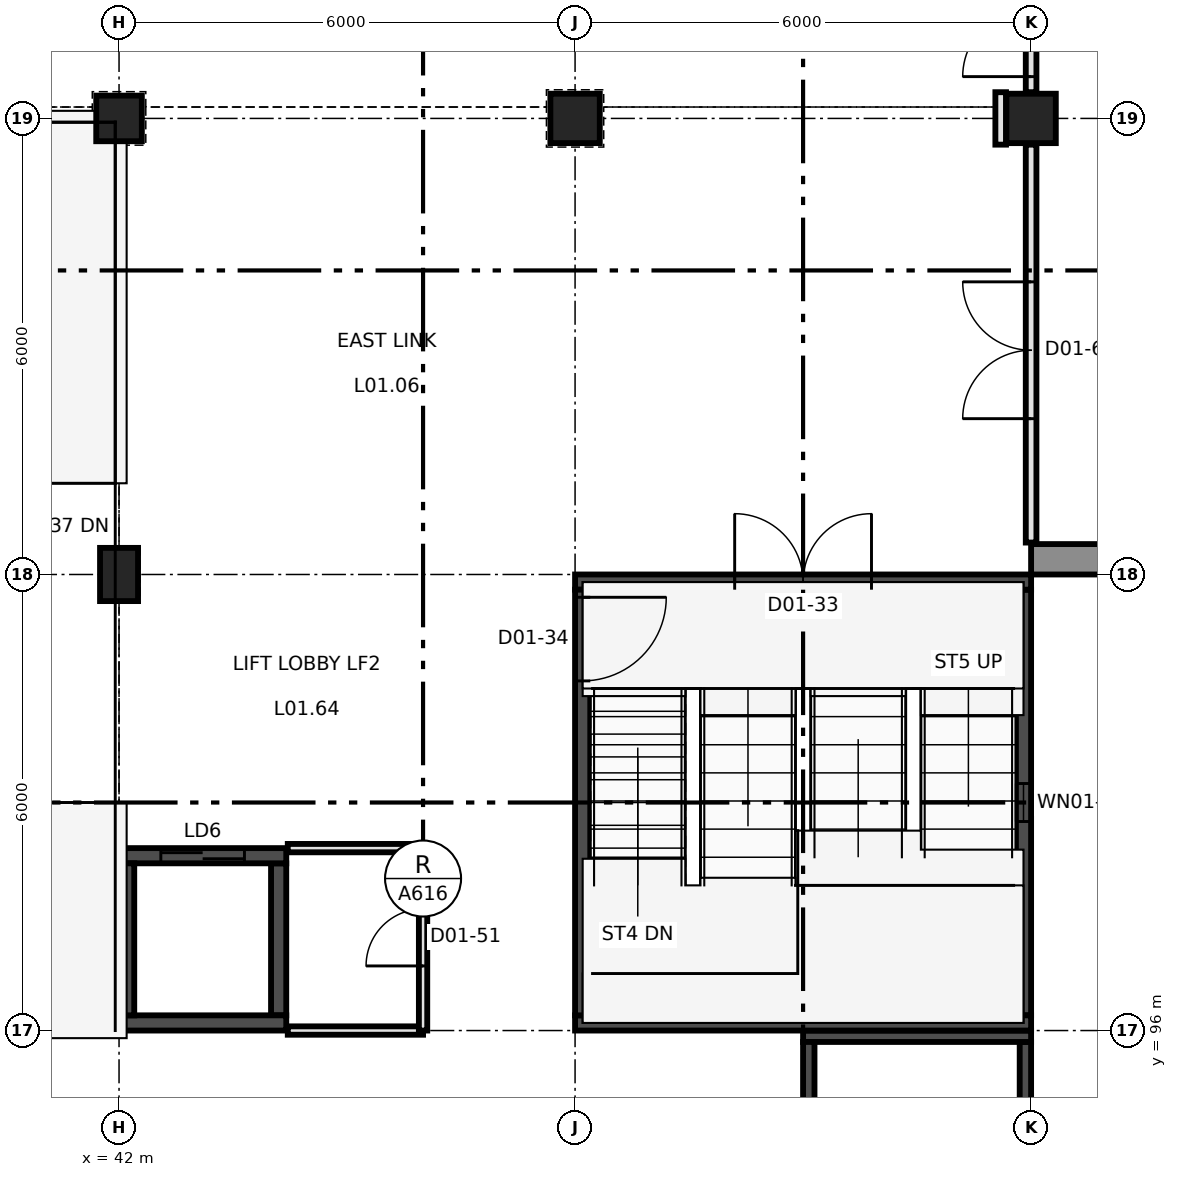
"""IFC4 building model, lengths in metres.
Left out: names, types, materials, properties, quantities, classifications, styles, units other than length and angle.
Written with IfcOpenShell. Run it as: python <this file> out.ifc"""

import sys

from ifc_helpers import new_model, si_unit, direction, frame, frame_2d, origin, origin_2d, place, context, subcontext, project, spatial, rectangle, extrude, element, fill, save


model = new_model("IFC4")
c1 = context("Model", 3, precision=1e-05, world=origin(), true_north=direction((0.0, 1.0)))
c2 = subcontext(c1, "Body", "Model", "MODEL_VIEW")
j1 = project(units=[si_unit("LENGTHUNIT", "METRE"), si_unit("PLANEANGLEUNIT", "RADIAN")], contexts=[c1])
p1 = place(None, origin())
s1 = spatial("IfcSite", under=j1, at=p1, CompositionType="ELEMENT")
p2 = place(p1, origin())
s2 = spatial("IfcBuilding", under=s1, at=p2, CompositionType="ELEMENT")
p3 = place(p2, frame((0.0, 0.0, 7.0)))
s3 = spatial("IfcBuildingStorey", under=s2, at=p3, CompositionType="ELEMENT", Elevation=7.0)
p4 = place(p3, frame((42.0, 102.0, 0.0), z_axis=(0.0, 0.0, 1.0), x_axis=(1.0, 0.0, 0.0)))
e1 = element("IfcColumn", 1, at=p4, inside=s3, PredefinedType="COLUMN", context=c2, shape_type="SweptSolid", body=[
    extrude(rectangle(XDim=0.5, YDim=0.7, at=origin_2d()), origin(), (0.0, 0.0, 1.0), 5.0),
])
p5 = place(p3, frame((42.0, 108.0, 0.0), z_axis=(0.0, 0.0, 1.0), x_axis=(1.0, 0.0, 0.0)))
e2 = element("IfcColumn", 2, at=p5, inside=s3, PredefinedType="COLUMN", context=c2, shape_type="SweptSolid", body=[
    extrude(rectangle(XDim=0.6, YDim=0.6, at=origin_2d()), origin(), (0.0, 0.0, 1.0), 5.0),
])
for number, where, z_axis, x_axis in (
    (3, (48.0, 108.0, 0.0), (0.0, 0.0, 1.0), (1.0, 0.0, 0.0)),
    (4, (54.0, 108.0, 0.0), (0.0, 0.0, 1.0), (1.0, 0.0, 0.0)),
):
    element("IfcColumn", number, at=place(p3, frame(where, z_axis=z_axis, x_axis=x_axis)), inside=s3, PredefinedType="COLUMN", context=c2, shape_type="SweptSolid", body=[
        extrude(rectangle(XDim=0.65, YDim=0.65, at=origin_2d()), origin(), (0.0, 0.0, 1.0), 5.0),
    ])
p6 = place(p3, frame((48.0, 101.9, 0.0), z_axis=(0.0, 0.0, 1.0), x_axis=(1.0, 0.0, 0.0)))
e5 = element("IfcWall", 5, at=p6, inside=s3, PredefinedType="SHEAR", context=c2, shape_type="SweptSolid", body=[
    extrude(rectangle(XDim=6.0, YDim=0.2, at=frame_2d((3.0, 0.0))), origin(), (0.0, 0.0, 1.0), 5.0),
])
p7 = place(p6, frame((2.1, 0.0, 0.0)))
e6 = element("IfcOpeningElement", 6, at=p7, cuts=e5, PredefinedType="OPENING", context=c2, shape_type="SweptSolid", body=[
    extrude(rectangle(XDim=1.8, YDim=2.2, at=frame_2d((0.9, 1.1))), frame((0.0, 0.11, 0.0), z_axis=(0.0, -1.0, 0.0), x_axis=(1.0, 0.0, 0.0)), (0.0, 0.0, 1.0), 0.22),
])
p8 = place(p3, frame((48.0, 96.1, 0.0), z_axis=(0.0, 0.0, 1.0), x_axis=(1.0, 0.0, 0.0)))
e7 = element("IfcWall", 7, at=p8, inside=s3, PredefinedType="SHEAR", context=c2, shape_type="SweptSolid", body=[
    extrude(rectangle(XDim=6.0, YDim=0.2, at=frame_2d((3.0, 0.0))), origin(), (0.0, 0.0, 1.0), 5.0),
])
p9 = place(p3, frame((48.1, 96.2, 0.0), z_axis=(0.0, 0.0, 1.0), x_axis=(0.0, 1.0, 0.0)))
e8 = element("IfcWall", 8, at=p9, inside=s3, PredefinedType="SHEAR", context=c2, shape_type="SweptSolid", body=[
    extrude(rectangle(XDim=5.6, YDim=0.2, at=frame_2d((2.8, 0.0))), origin(), (0.0, 0.0, 1.0), 5.0),
])
p10 = place(p9, frame((4.4, 0.0, 0.0)))
e9 = element("IfcOpeningElement", 9, at=p10, cuts=e8, PredefinedType="OPENING", context=c2, shape_type="SweptSolid", body=[
    extrude(rectangle(XDim=1.1, YDim=2.2, at=frame_2d((0.55, 1.1))), frame((0.0, 0.11, 0.0), z_axis=(0.0, -1.0, 0.0), x_axis=(1.0, 0.0, 0.0)), (0.0, 0.0, 1.0), 0.22),
])
p11 = place(p3, frame((53.9, 96.2, 0.0), z_axis=(0.0, 0.0, 1.0), x_axis=(0.0, 1.0, 0.0)))
e10 = element("IfcWall", 10, at=p11, inside=s3, PredefinedType="SHEAR", context=c2, shape_type="SweptSolid", body=[
    extrude(rectangle(XDim=5.6, YDim=0.2, at=frame_2d((2.8, 0.0))), origin(), (0.0, 0.0, 1.0), 5.0),
])
p12 = place(p11, frame((2.55, 0.0, 0.9)))
e11 = element("IfcOpeningElement", 11, at=p12, cuts=e10, PredefinedType="OPENING", context=c2, shape_type="SweptSolid", body=[
    extrude(rectangle(XDim=0.5, YDim=2.1, at=frame_2d((0.25, 1.05))), frame((0.0, 0.11, 0.0), z_axis=(0.0, -1.0, 0.0), x_axis=(1.0, 0.0, 0.0)), (0.0, 0.0, 1.0), 0.22),
])
p13 = place(p3, frame((42.0, 98.3, 0.0), z_axis=(0.0, 0.0, 1.0), x_axis=(1.0, 0.0, 0.0)))
e12 = element("IfcWall", 12, at=p13, inside=s3, PredefinedType="SHEAR", context=c2, shape_type="SweptSolid", body=[
    extrude(rectangle(XDim=2.2, YDim=0.2, at=frame_2d((1.1, 0.0))), origin(), (0.0, 0.0, 1.0), 5.0),
])
p14 = place(p13, frame((0.55, 0.0, 0.0)))
e13 = element("IfcOpeningElement", 13, at=p14, cuts=e12, PredefinedType="OPENING", context=c2, shape_type="SweptSolid", body=[
    extrude(rectangle(XDim=1.1, YDim=2.1, at=frame_2d((0.55, 1.05))), frame((0.0, 0.11, 0.0), z_axis=(0.0, -1.0, 0.0), x_axis=(1.0, 0.0, 0.0)), (0.0, 0.0, 1.0), 0.22),
])
p15 = place(p3, frame((42.0, 96.1, 0.0), z_axis=(0.0, 0.0, 1.0), x_axis=(1.0, 0.0, 0.0)))
e14 = element("IfcWall", 14, at=p15, inside=s3, PredefinedType="SHEAR", context=c2, shape_type="SweptSolid", body=[
    extrude(rectangle(XDim=2.2, YDim=0.2, at=frame_2d((1.1, 0.0))), origin(), (0.0, 0.0, 1.0), 5.0),
])
for number, where, z_axis, x_axis in (
    (15, (42.1, 96.2, 0.0), (0.0, 0.0, 1.0), (0.0, 1.0, 0.0)),
    (16, (44.1, 96.2, 0.0), (0.0, 0.0, 1.0), (0.0, 1.0, 0.0)),
):
    element("IfcWall", number, at=place(p3, frame(where, z_axis=z_axis, x_axis=x_axis)), inside=s3, PredefinedType="SHEAR", context=c2, shape_type="SweptSolid", body=[
        extrude(rectangle(XDim=2.0, YDim=0.2, at=frame_2d((1.0, 0.0))), origin(), (0.0, 0.0, 1.0), 5.0),
    ])
p16 = place(p3, frame((51.0, 95.925, 0.0), z_axis=(0.0, 0.0, 1.0), x_axis=(1.0, 0.0, 0.0)))
e17 = element("IfcWall", 17, at=p16, inside=s3, PredefinedType="SHEAR", context=c2, shape_type="SweptSolid", body=[
    extrude(rectangle(XDim=3.0, YDim=0.15, at=frame_2d((1.5, 0.0))), origin(), (0.0, 0.0, 1.0), 5.0),
])
for number, where, z_axis, x_axis in (
    (18, (51.075, 90.15, 0.0), (0.0, 0.0, 1.0), (0.0, 1.0, 0.0)),
    (19, (53.925, 90.15, 0.0), (0.0, 0.0, 1.0), (0.0, 1.0, 0.0)),
):
    element("IfcWall", number, at=place(p3, frame(where, z_axis=z_axis, x_axis=x_axis)), inside=s3, PredefinedType="SHEAR", context=c2, shape_type="SweptSolid", body=[
        extrude(rectangle(XDim=5.7, YDim=0.15, at=frame_2d((2.85, 0.0))), origin(), (0.0, 0.0, 1.0), 5.0),
    ])
p17 = place(p3, frame((60.0, 102.2, 0.0), z_axis=(0.0, 0.0, 1.0), x_axis=(-1.0, 0.0, 0.0)))
e20 = element("IfcWall", 20, at=p17, inside=s3, PredefinedType="SOLIDWALL", context=c2, shape_type="SweptSolid", body=[
    extrude(rectangle(XDim=6.0, YDim=0.4, at=frame_2d((3.0, 0.0))), origin(), (0.0, 0.0, 1.0), 4.05),
])
p18 = place(p17, frame((1.8, 0.0, 0.9)))
e21 = element("IfcOpeningElement", 21, at=p18, cuts=e20, PredefinedType="OPENING", context=c2, shape_type="SweptSolid", body=[
    extrude(rectangle(XDim=2.4, YDim=2.95, at=frame_2d((1.2, 1.475))), frame((0.0, 0.21, 0.0), z_axis=(0.0, -1.0, 0.0), x_axis=(1.0, 0.0, 0.0)), (0.0, 0.0, 1.0), 0.42),
])
p19 = place(p3, frame((44.22, 96.0, 0.0), z_axis=(0.0, 0.0, 1.0), x_axis=(1.0, 0.0, 0.0)))
e22 = element("IfcWall", 22, at=p19, inside=s3, PredefinedType="PARTITIONING", context=c2, shape_type="SweptSolid", body=[
    extrude(rectangle(XDim=1.78, YDim=0.11, at=frame_2d((0.89, 0.0))), origin(), (0.0, 0.0, 1.0), 4.15),
])
p20 = place(p3, frame((46.0, 96.0, 0.0), z_axis=(0.0, 0.0, 1.0), x_axis=(0.0, 1.0, 0.0)))
e23 = element("IfcWall", 23, at=p20, inside=s3, PredefinedType="PARTITIONING", context=c2, shape_type="SweptSolid", body=[
    extrude(rectangle(XDim=2.4, YDim=0.11, at=frame_2d((1.2, 0.0))), origin(), (0.0, 0.0, 1.0), 4.15),
])
p21 = place(p20, frame((0.85, 0.0, 0.0)))
e24 = element("IfcOpeningElement", 24, at=p21, cuts=e23, PredefinedType="OPENING", context=c2, shape_type="SweptSolid", body=[
    extrude(rectangle(XDim=0.75, YDim=2.04, at=frame_2d((0.375, 1.02))), frame((0.0, 0.065, 0.0), z_axis=(0.0, -1.0, 0.0), x_axis=(1.0, 0.0, 0.0)), (0.0, 0.0, 1.0), 0.13),
])
p22 = place(p3, frame((44.22, 98.4, 0.0), z_axis=(0.0, 0.0, 1.0), x_axis=(1.0, 0.0, 0.0)))
e25 = element("IfcWall", 25, at=p22, inside=s3, PredefinedType="PARTITIONING", context=c2, shape_type="SweptSolid", body=[
    extrude(rectangle(XDim=1.78, YDim=0.11, at=frame_2d((0.89, 0.0))), origin(), (0.0, 0.0, 1.0), 4.75),
])
p23 = place(p3, frame((54.0, 102.42, 0.0), z_axis=(0.0, 0.0, 1.0), x_axis=(0.0, 1.0, 0.0)))
e26 = element("IfcWall", 26, at=p23, inside=s3, PredefinedType="PARTITIONING", context=c2, shape_type="SweptSolid", body=[
    extrude(rectangle(XDim=5.235, YDim=0.14, at=frame_2d((2.618, 0.0))), origin(), (0.0, 0.0, 1.0), 4.15),
])
p24 = place(p23, frame((1.63, 0.0, 0.0)))
e27 = element("IfcOpeningElement", 27, at=p24, cuts=e26, PredefinedType="OPENING", context=c2, shape_type="SweptSolid", body=[
    extrude(rectangle(XDim=1.8, YDim=2.1, at=frame_2d((0.9, 1.05))), frame((0.0, 0.08, 0.0), z_axis=(0.0, -1.0, 0.0), x_axis=(1.0, 0.0, 0.0)), (0.0, 0.0, 1.0), 0.16),
])
p25 = place(p3, frame((54.0, 108.345, 0.0), z_axis=(0.0, 0.0, 1.0), x_axis=(0.0, 1.0, 0.0)))
e28 = element("IfcWall", 28, at=p25, inside=s3, PredefinedType="PARTITIONING", context=c2, shape_type="SweptSolid", body=[
    extrude(rectangle(XDim=5.31, YDim=0.14, at=frame_2d((2.655, 0.0))), origin(), (0.0, 0.0, 1.0), 4.05),
])
p26 = place(p25, frame((0.205, 0.0, 0.0)))
e29 = element("IfcOpeningElement", 29, at=p26, cuts=e28, PredefinedType="OPENING", context=c2, shape_type="SweptSolid", body=[
    extrude(rectangle(XDim=1.8, YDim=2.1, at=frame_2d((0.9, 1.05))), frame((0.0, 0.08, 0.0), z_axis=(0.0, -1.0, 0.0), x_axis=(1.0, 0.0, 0.0)), (0.0, 0.0, 1.0), 0.16),
])
p27 = place(p3, frame((53.6, 107.655, 0.0), z_axis=(0.0, 0.0, 1.0), x_axis=(0.0, 1.0, 0.0)))
e30 = element("IfcWall", 30, at=p27, inside=s3, PredefinedType="PARTITIONING", context=c2, shape_type="SweptSolid", body=[
    extrude(rectangle(XDim=0.69, YDim=0.14, at=frame_2d((0.345, 0.0))), origin(), (0.0, 0.0, 1.0), 4.05),
])
p28 = place(p12, origin())
e31 = element("IfcWindow", 31, at=p28, inside=s3, PartitioningType="SINGLE_PANEL", PredefinedType="WINDOW", context=c2, shape_type="SweptSolid", body=[
    extrude(rectangle(XDim=0.5, YDim=2.1, at=frame_2d((0.25, 1.05))), frame((0.0, 0.03, 0.0), z_axis=(0.0, -1.0, 0.0), x_axis=(1.0, 0.0, 0.0)), (0.0, 0.0, 1.0), 0.06),
])
fill(e11, e31)
p29 = place(p7, frame((1.8, 0.0, 0.0), z_axis=(0.0, 0.0, 1.0), x_axis=(-1.0, 0.0, 0.0)))
e32 = element("IfcDoor", 32, at=p29, inside=s3, OperationType="DOUBLE_DOOR_SINGLE_SWING", PredefinedType="DOOR", context=c2, shape_type="SweptSolid", body=[
    extrude(rectangle(XDim=1.8, YDim=2.2, at=frame_2d((0.9, 1.1))), frame((0.0, 0.025, 0.0), z_axis=(0.0, -1.0, 0.0), x_axis=(1.0, 0.0, 0.0)), (0.0, 0.0, 1.0), 0.05),
])
fill(e6, e32)
p30 = place(p10, frame((1.1, 0.0, 0.0), z_axis=(0.0, 0.0, 1.0), x_axis=(-1.0, 0.0, 0.0)))
e33 = element("IfcDoor", 33, at=p30, inside=s3, OperationType="SINGLE_SWING_RIGHT", PredefinedType="DOOR", context=c2, shape_type="SweptSolid", body=[
    extrude(rectangle(XDim=1.1, YDim=2.2, at=frame_2d((0.55, 1.1))), frame((0.0, 0.025, 0.0), z_axis=(0.0, -1.0, 0.0), x_axis=(1.0, 0.0, 0.0)), (0.0, 0.0, 1.0), 0.05),
])
fill(e9, e33)
p31 = place(p21, origin())
e34 = element("IfcDoor", 34, at=p31, inside=s3, OperationType="SINGLE_SWING_LEFT", PredefinedType="DOOR", context=c2, shape_type="SweptSolid", body=[
    extrude(rectangle(XDim=0.75, YDim=2.04, at=frame_2d((0.375, 1.02))), frame((0.0, 0.025, 0.0), z_axis=(0.0, -1.0, 0.0), x_axis=(1.0, 0.0, 0.0)), (0.0, 0.0, 1.0), 0.05),
])
fill(e24, e34)
p32 = place(p24, origin())
e35 = element("IfcDoor", 35, at=p32, inside=s3, OperationType="DOUBLE_DOOR_SINGLE_SWING", PredefinedType="DOOR", context=c2, shape_type="SweptSolid", body=[
    extrude(rectangle(XDim=1.8, YDim=2.1, at=frame_2d((0.9, 1.05))), frame((0.0, 0.025, 0.0), z_axis=(0.0, -1.0, 0.0), x_axis=(1.0, 0.0, 0.0)), (0.0, 0.0, 1.0), 0.05),
])
fill(e27, e35)
p33 = place(p26, origin())
e36 = element("IfcDoor", 36, at=p33, inside=s3, OperationType="DOUBLE_DOOR_SINGLE_SWING", PredefinedType="DOOR", context=c2, shape_type="SweptSolid", body=[
    extrude(rectangle(XDim=1.8, YDim=2.1, at=frame_2d((0.9, 1.05))), frame((0.0, 0.025, 0.0), z_axis=(0.0, -1.0, 0.0), x_axis=(1.0, 0.0, 0.0)), (0.0, 0.0, 1.0), 0.05),
])
fill(e29, e36)
p34 = place(p14, origin())
e37 = element("IfcDoor", 37, at=p34, inside=s3, OperationType="DOUBLE_DOOR_SLIDING", PredefinedType="DOOR", context=c2, shape_type="SweptSolid", body=[
    extrude(rectangle(XDim=1.1, YDim=2.1, at=frame_2d((0.55, 1.05))), frame((0.0, 0.025, 0.0), z_axis=(0.0, -1.0, 0.0), x_axis=(1.0, 0.0, 0.0)), (0.0, 0.0, 1.0), 0.05),
])
fill(e13, e37)
save(model, sys.argv[1])
